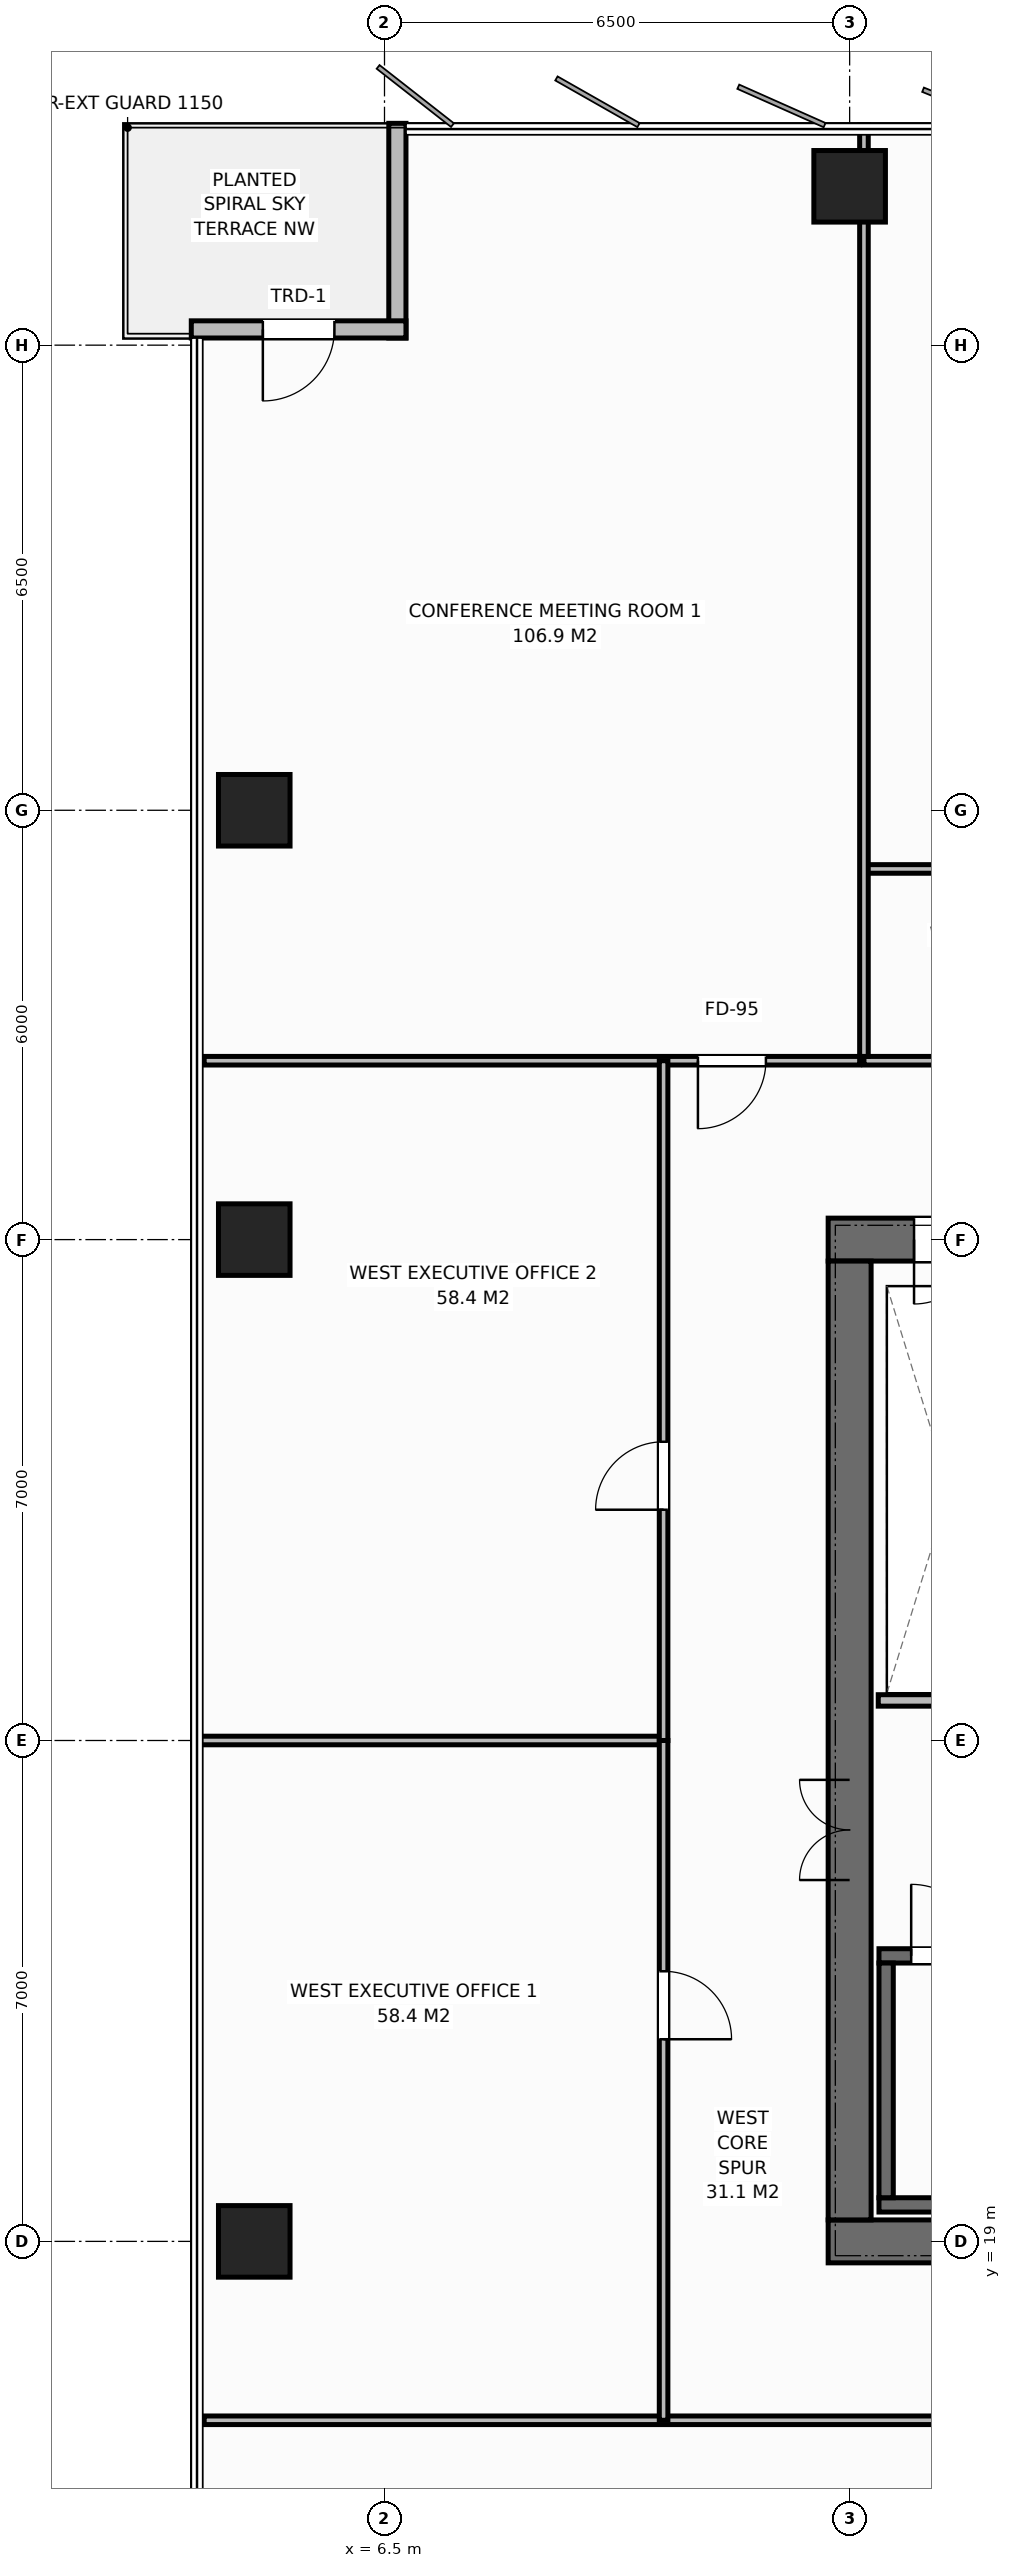
"""IFC4 building model, lengths in metres.
Left out: names, types, materials, properties, quantities, classifications, styles, units other than length and angle.
Written with IfcOpenShell. Run it as: python <this file> out.ifc"""

import sys

from ifc_helpers import new_model, si_unit, direction, frame, frame_2d, origin, origin_2d, place, context, subcontext, project, spatial, rectangle, extrude, element, fill, save


model = new_model("IFC4")
c1 = context("Model", 3, precision=1e-05, world=origin(), true_north=direction((0.0, 1.0)))
c2 = subcontext(c1, "Body", "Model", "MODEL_VIEW")
j1 = project(units=[si_unit("LENGTHUNIT", "METRE"), si_unit("PLANEANGLEUNIT", "RADIAN")], contexts=[c1])
p1 = place(None, origin())
s1 = spatial("IfcSite", under=j1, at=p1, CompositionType="ELEMENT")
p2 = place(p1, origin())
s2 = spatial("IfcBuilding", under=s1, at=p2, CompositionType="ELEMENT")
p3 = place(p2, frame((0.0, 0.0, 148.0)))
s3 = spatial("IfcBuildingStorey", under=s2, at=p3, CompositionType="ELEMENT", Elevation=148.0)
p4 = place(p3, frame((12.7, 19.0, 0.0), z_axis=(0.0, 0.0, 1.0), x_axis=(1.0, 0.0, 0.0)))
e1 = element("IfcWall", 1, at=p4, inside=s3, PredefinedType="SHEAR", context=c2, shape_type="SweptSolid", body=[
    extrude(rectangle(XDim=13.6, YDim=0.6, at=frame_2d((6.8, 0.0))), origin(), (0.0, 0.0, 1.0), 3.8),
])
p5 = place(p4, frame((9.18, 0.0, 0.0)))
e2 = element("IfcOpeningElement", 2, at=p5, cuts=e1, PredefinedType="OPENING", context=c2, shape_type="SweptSolid", body=[
    extrude(rectangle(XDim=1.4, YDim=2.2, at=frame_2d((0.7, 1.1))), frame((0.0, 0.31, 0.0), z_axis=(0.0, -1.0, 0.0), x_axis=(1.0, 0.0, 0.0)), (0.0, 0.0, 1.0), 0.62),
])
p6 = place(p3, frame((12.7, 33.0, 0.0), z_axis=(0.0, 0.0, 1.0), x_axis=(1.0, 0.0, 0.0)))
e3 = element("IfcWall", 3, at=p6, inside=s3, PredefinedType="SHEAR", context=c2, shape_type="SweptSolid", body=[
    extrude(rectangle(XDim=13.6, YDim=0.6, at=frame_2d((6.8, 0.0))), origin(), (0.0, 0.0, 1.0), 3.8),
])
p7 = place(p6, frame((1.2, 0.0, 0.0)))
e4 = element("IfcOpeningElement", 4, at=p7, cuts=e3, PredefinedType="OPENING", context=c2, shape_type="SweptSolid", body=[
    extrude(rectangle(XDim=0.9, YDim=2.15, at=frame_2d((0.45, 1.075))), frame((0.0, 0.31, 0.0), z_axis=(0.0, -1.0, 0.0), x_axis=(1.0, 0.0, 0.0)), (0.0, 0.0, 1.0), 0.62),
])
p8 = place(p6, frame((3.1, 0.0, 0.0)))
e5 = element("IfcOpeningElement", 5, at=p8, cuts=e3, PredefinedType="OPENING", context=c2, shape_type="SweptSolid", body=[
    extrude(rectangle(XDim=0.9, YDim=2.15, at=frame_2d((0.45, 1.075))), frame((0.0, 0.31, 0.0), z_axis=(0.0, -1.0, 0.0), x_axis=(1.0, 0.0, 0.0)), (0.0, 0.0, 1.0), 0.62),
])
p9 = place(p6, frame((4.9, 0.0, 0.0)))
e6 = element("IfcOpeningElement", 6, at=p9, cuts=e3, PredefinedType="OPENING", context=c2, shape_type="SweptSolid", body=[
    extrude(rectangle(XDim=0.9, YDim=2.15, at=frame_2d((0.45, 1.075))), frame((0.0, 0.31, 0.0), z_axis=(0.0, -1.0, 0.0), x_axis=(1.0, 0.0, 0.0)), (0.0, 0.0, 1.0), 0.62),
])
p10 = place(p6, frame((6.8, 0.0, 0.0)))
e7 = element("IfcOpeningElement", 7, at=p10, cuts=e3, PredefinedType="OPENING", context=c2, shape_type="SweptSolid", body=[
    extrude(rectangle(XDim=0.9, YDim=2.15, at=frame_2d((0.45, 1.075))), frame((0.0, 0.31, 0.0), z_axis=(0.0, -1.0, 0.0), x_axis=(1.0, 0.0, 0.0)), (0.0, 0.0, 1.0), 0.62),
])
p11 = place(p6, frame((9.18, 0.0, 0.0)))
e8 = element("IfcOpeningElement", 8, at=p11, cuts=e3, PredefinedType="OPENING", context=c2, shape_type="SweptSolid", body=[
    extrude(rectangle(XDim=1.4, YDim=2.2, at=frame_2d((0.7, 1.1))), frame((0.0, 0.31, 0.0), z_axis=(0.0, -1.0, 0.0), x_axis=(1.0, 0.0, 0.0)), (0.0, 0.0, 1.0), 0.62),
])
p12 = place(p3, frame((13.0, 19.3, 0.0), z_axis=(0.0, 0.0, 1.0), x_axis=(0.0, 1.0, 0.0)))
e9 = element("IfcWall", 9, at=p12, inside=s3, PredefinedType="SHEAR", context=c2, shape_type="SweptSolid", body=[
    extrude(rectangle(XDim=13.4, YDim=0.6, at=frame_2d((6.7, 0.0))), origin(), (0.0, 0.0, 1.0), 3.8),
])
p13 = place(p12, frame((4.75, 0.0, 0.0)))
e10 = element("IfcOpeningElement", 10, at=p13, cuts=e9, PredefinedType="OPENING", context=c2, shape_type="SweptSolid", body=[
    extrude(rectangle(XDim=1.4, YDim=2.2, at=frame_2d((0.7, 1.1))), frame((0.0, 0.31, 0.0), z_axis=(0.0, -1.0, 0.0), x_axis=(1.0, 0.0, 0.0)), (0.0, 0.0, 1.0), 0.62),
])
p14 = place(p3, frame((13.41, 19.51, 0.0), z_axis=(0.0, 0.0, 1.0), x_axis=(1.0, 0.0, 0.0)))
e11 = element("IfcWall", 11, at=p14, inside=s3, PredefinedType="SHEAR", context=c2, shape_type="SweptSolid", body=[
    extrude(rectangle(XDim=8.43, YDim=0.2, at=frame_2d((4.215, 0.0))), origin(), (0.0, 0.0, 1.0), 3.8),
])
p15 = place(p3, frame((13.41, 22.99, 0.0), z_axis=(0.0, 0.0, 1.0), x_axis=(1.0, 0.0, 0.0)))
e12 = element("IfcWall", 12, at=p15, inside=s3, PredefinedType="SHEAR", context=c2, shape_type="SweptSolid", body=[
    extrude(rectangle(XDim=8.43, YDim=0.2, at=frame_2d((4.215, 0.0))), origin(), (0.0, 0.0, 1.0), 3.8),
])
p16 = place(p15, frame((0.45, 0.0, 0.0)))
e13 = element("IfcOpeningElement", 13, at=p16, cuts=e12, PredefinedType="OPENING", context=c2, shape_type="SweptSolid", body=[
    extrude(rectangle(XDim=1.0, YDim=2.15, at=frame_2d((0.5, 1.075))), frame((0.0, 0.11, 0.0), z_axis=(0.0, -1.0, 0.0), x_axis=(1.0, 0.0, 0.0)), (0.0, 0.0, 1.0), 0.22),
])
p17 = place(p3, frame((13.51, 19.61, 0.0), z_axis=(0.0, 0.0, 1.0), x_axis=(0.0, 1.0, 0.0)))
e14 = element("IfcWall", 14, at=p17, inside=s3, PredefinedType="SHEAR", context=c2, shape_type="SweptSolid", body=[
    extrude(rectangle(XDim=3.28, YDim=0.2, at=frame_2d((1.64, 0.0))), origin(), (0.0, 0.0, 1.0), 3.8),
])
for number, where, z_axis, x_axis in (
    (15, (13.0, 47.72, 0.0), (0.0, 0.0, 1.0), (1.0, 0.0, 0.0)),
    (16, (4.68, 19.0, 0.0), (0.0, 0.0, 1.0), (1.0, 0.0, 0.0)),
    (17, (4.68, 33.0, 0.0), (0.0, 0.0, 1.0), (1.0, 0.0, 0.0)),
    (18, (4.68, 39.0, 0.0), (0.0, 0.0, 1.0), (1.0, 0.0, 0.0)),
):
    element("IfcColumn", number, at=place(p3, frame(where, z_axis=z_axis, x_axis=x_axis)), inside=s3, PredefinedType="COLUMN", context=c2, shape_type="SweptSolid", body=[
        extrude(rectangle(XDim=1.0, YDim=1.0, at=origin_2d()), origin(), (0.0, 0.0, 1.0), 3.8),
    ])
p18 = place(p3, frame((6.68, 45.6, 0.0), z_axis=(0.0, 0.0, 1.0), x_axis=(0.0, 1.0, 0.0)))
e19 = element("IfcWall", 19, at=p18, inside=s3, PredefinedType="STANDARD", context=c2, shape_type="SweptSolid", body=[
    extrude(rectangle(XDim=3.0, YDim=0.24, at=frame_2d((1.5, 0.0))), origin(), (0.0, 0.0, 1.0), 3.572),
])
p19 = place(p3, frame((3.8, 45.72, 0.0), z_axis=(0.0, 0.0, 1.0), x_axis=(1.0, 0.0, 0.0)))
e20 = element("IfcWall", 20, at=p19, inside=s3, PredefinedType="STANDARD", context=c2, shape_type="SweptSolid", body=[
    extrude(rectangle(XDim=3.0, YDim=0.24, at=frame_2d((1.5, 0.0))), origin(), (0.0, 0.0, 1.0), 3.572),
])
p20 = place(p19, frame((1.0, 0.0, 0.0)))
e21 = element("IfcOpeningElement", 21, at=p20, cuts=e20, PredefinedType="OPENING", context=c2, shape_type="SweptSolid", body=[
    extrude(rectangle(XDim=1.0, YDim=2.2, at=frame_2d((0.5, 1.1))), frame((0.0, 0.13, 0.0), z_axis=(0.0, -1.0, 0.0), x_axis=(1.0, 0.0, 0.0)), (0.0, 0.0, 1.0), 0.26),
])
p21 = place(p3, frame((13.4, 26.56, 0.0), z_axis=(0.0, 0.0, 1.0), x_axis=(1.0, 0.0, 0.0)))
e22 = element("IfcWall", 22, at=p21, inside=s3, PredefinedType="STANDARD", context=c2, shape_type="SweptSolid", body=[
    extrude(rectangle(XDim=8.34, YDim=0.16, at=frame_2d((4.17, 0.0))), origin(), (0.0, 0.0, 1.0), 3.572),
])
p22 = place(p3, frame((13.2, 35.5, 0.0), z_axis=(0.0, 0.0, 1.0), x_axis=(1.0, 0.0, 0.0)))
e23 = element("IfcWall", 23, at=p22, inside=s3, PredefinedType="PARTITIONING", context=c2, shape_type="SweptSolid", body=[
    extrude(rectangle(XDim=13.16, YDim=0.12, at=frame_2d((6.58, 0.0))), origin(), (0.0, 0.0, 1.0), 3.572),
])
p23 = place(p22, frame((1.35, 0.0, 0.0)))
e24 = element("IfcOpeningElement", 24, at=p23, cuts=e23, PredefinedType="OPENING", context=c2, shape_type="SweptSolid", body=[
    extrude(rectangle(XDim=0.9, YDim=2.15, at=frame_2d((0.45, 1.075))), frame((0.0, 0.07, 0.0), z_axis=(0.0, -1.0, 0.0), x_axis=(1.0, 0.0, 0.0)), (0.0, 0.0, 1.0), 0.14),
])
p24 = place(p22, frame((4.05, 0.0, 0.0)))
e25 = element("IfcOpeningElement", 25, at=p24, cuts=e23, PredefinedType="OPENING", context=c2, shape_type="SweptSolid", body=[
    extrude(rectangle(XDim=0.9, YDim=2.15, at=frame_2d((0.45, 1.075))), frame((0.0, 0.07, 0.0), z_axis=(0.0, -1.0, 0.0), x_axis=(1.0, 0.0, 0.0)), (0.0, 0.0, 1.0), 0.14),
])
p25 = place(p22, frame((8.25, 0.0, 0.0)))
e26 = element("IfcOpeningElement", 26, at=p25, cuts=e23, PredefinedType="OPENING", context=c2, shape_type="SweptSolid", body=[
    extrude(rectangle(XDim=0.9, YDim=2.15, at=frame_2d((0.45, 1.075))), frame((0.0, 0.07, 0.0), z_axis=(0.0, -1.0, 0.0), x_axis=(1.0, 0.0, 0.0)), (0.0, 0.0, 1.0), 0.14),
])
p26 = place(p22, frame((11.0, 0.0, 0.0)))
e27 = element("IfcOpeningElement", 27, at=p26, cuts=e23, PredefinedType="OPENING", context=c2, shape_type="SweptSolid", body=[
    extrude(rectangle(XDim=0.95, YDim=2.15, at=frame_2d((0.475, 1.075))), frame((0.0, 0.07, 0.0), z_axis=(0.0, -1.0, 0.0), x_axis=(1.0, 0.0, 0.0)), (0.0, 0.0, 1.0), 0.14),
])
p27 = place(p3, frame((13.2, 38.18, 0.0), z_axis=(0.0, 0.0, 1.0), x_axis=(1.0, 0.0, 0.0)))
e28 = element("IfcWall", 28, at=p27, inside=s3, PredefinedType="PARTITIONING", context=c2, shape_type="SweptSolid", body=[
    extrude(rectangle(XDim=13.16, YDim=0.12, at=frame_2d((6.58, 0.0))), origin(), (0.0, 0.0, 1.0), 3.572),
])
p28 = place(p3, frame((13.2, 35.56, 0.0), z_axis=(0.0, 0.0, 1.0), x_axis=(0.0, 1.0, 0.0)))
e29 = element("IfcWall", 29, at=p28, inside=s3, PredefinedType="PARTITIONING", context=c2, shape_type="SweptSolid", body=[
    extrude(rectangle(XDim=13.02, YDim=0.12, at=frame_2d((6.51, 0.0))), origin(), (0.0, 0.0, 1.0), 3.022),
])
p29 = place(p3, frame((3.98, 35.5, 0.0), z_axis=(0.0, 0.0, 1.0), x_axis=(1.0, 0.0, 0.0)))
e30 = element("IfcWall", 30, at=p29, inside=s3, PredefinedType="PARTITIONING", context=c2, shape_type="SweptSolid", body=[
    extrude(rectangle(XDim=9.16, YDim=0.12, at=frame_2d((4.58, 0.0))), origin(), (0.0, 0.0, 1.0), 3.572),
])
p30 = place(p29, frame((6.9, 0.0, 0.0)))
e31 = element("IfcOpeningElement", 31, at=p30, cuts=e30, PredefinedType="OPENING", context=c2, shape_type="SweptSolid", body=[
    extrude(rectangle(XDim=0.95, YDim=2.15, at=frame_2d((0.475, 1.075))), frame((0.0, 0.07, 0.0), z_axis=(0.0, -1.0, 0.0), x_axis=(1.0, 0.0, 0.0)), (0.0, 0.0, 1.0), 0.14),
])
p31 = place(p3, frame((3.98, 16.5, 0.0), z_axis=(0.0, 0.0, 1.0), x_axis=(1.0, 0.0, 0.0)))
e32 = element("IfcWall", 32, at=p31, inside=s3, PredefinedType="PARTITIONING", context=c2, shape_type="SweptSolid", body=[
    extrude(rectangle(XDim=15.02, YDim=0.12, at=frame_2d((7.51, 0.0))), origin(), (0.0, 0.0, 1.0), 3.572),
])
p32 = place(p31, frame((10.245, 0.0, 0.0)))
e33 = element("IfcOpeningElement", 33, at=p32, cuts=e32, PredefinedType="OPENING", context=c2, shape_type="SweptSolid", body=[
    extrude(rectangle(XDim=0.95, YDim=2.15, at=frame_2d((0.475, 1.075))), frame((0.0, 0.07, 0.0), z_axis=(0.0, -1.0, 0.0), x_axis=(1.0, 0.0, 0.0)), (0.0, 0.0, 1.0), 0.14),
])
p33 = place(p3, frame((3.82, 26.0, 0.0), z_axis=(0.0, 0.0, 1.0), x_axis=(1.0, 0.0, 0.0)))
e34 = element("IfcWall", 34, at=p33, inside=s3, PredefinedType="PARTITIONING", context=c2, shape_type="SweptSolid", body=[
    extrude(rectangle(XDim=6.58, YDim=0.12, at=frame_2d((3.29, 0.0))), origin(), (0.0, 0.0, 1.0), 3.572),
])
p34 = place(p3, frame((10.4, 16.5, 0.0), z_axis=(0.0, 0.0, 1.0), x_axis=(0.0, 1.0, 0.0)))
e35 = element("IfcWall", 35, at=p34, inside=s3, PredefinedType="PARTITIONING", context=c2, shape_type="SweptSolid", body=[
    extrude(rectangle(XDim=9.5, YDim=0.12, at=frame_2d((4.75, 0.0))), origin(), (0.0, 0.0, 1.0), 3.572),
])
p35 = place(p34, frame((5.325, 0.0, 0.0)))
e36 = element("IfcOpeningElement", 36, at=p35, cuts=e35, PredefinedType="OPENING", context=c2, shape_type="SweptSolid", body=[
    extrude(rectangle(XDim=0.95, YDim=2.15, at=frame_2d((0.475, 1.075))), frame((0.0, 0.07, 0.0), z_axis=(0.0, -1.0, 0.0), x_axis=(1.0, 0.0, 0.0)), (0.0, 0.0, 1.0), 0.14),
])
p36 = place(p3, frame((10.4, 26.0, 0.0), z_axis=(0.0, 0.0, 1.0), x_axis=(0.0, 1.0, 0.0)))
e37 = element("IfcWall", 37, at=p36, inside=s3, PredefinedType="PARTITIONING", context=c2, shape_type="SweptSolid", body=[
    extrude(rectangle(XDim=9.5, YDim=0.12, at=frame_2d((4.75, 0.0))), origin(), (0.0, 0.0, 1.0), 3.572),
])
p37 = place(p36, frame((3.225, 0.0, 0.0)))
e38 = element("IfcOpeningElement", 38, at=p37, cuts=e37, PredefinedType="OPENING", context=c2, shape_type="SweptSolid", body=[
    extrude(rectangle(XDim=0.95, YDim=2.15, at=frame_2d((0.475, 1.075))), frame((0.0, 0.07, 0.0), z_axis=(0.0, -1.0, 0.0), x_axis=(1.0, 0.0, 0.0)), (0.0, 0.0, 1.0), 0.14),
])
p38 = place(p20, origin())
e39 = element("IfcDoor", 39, at=p38, inside=s3, OperationType="SINGLE_SWING_RIGHT", PredefinedType="DOOR", context=c2, shape_type="SweptSolid", body=[
    extrude(rectangle(XDim=1.0, YDim=2.2, at=frame_2d((0.5, 1.1))), frame((0.0, 0.025, 0.0), z_axis=(0.0, -1.0, 0.0), x_axis=(1.0, 0.0, 0.0)), (0.0, 0.0, 1.0), 0.05),
])
fill(e21, e39)
p39 = place(p16, origin())
e40 = element("IfcDoor", 40, at=p39, inside=s3, OperationType="SINGLE_SWING_LEFT", PredefinedType="DOOR", context=c2, shape_type="SweptSolid", body=[
    extrude(rectangle(XDim=1.0, YDim=2.15, at=frame_2d((0.5, 1.075))), frame((0.0, 0.025, 0.0), z_axis=(0.0, -1.0, 0.0), x_axis=(1.0, 0.0, 0.0)), (0.0, 0.0, 1.0), 0.05),
])
fill(e13, e40)
p40 = place(p13, origin())
e41 = element("IfcDoor", 41, at=p40, inside=s3, OperationType="DOUBLE_DOOR_SINGLE_SWING", PredefinedType="DOOR", context=c2, shape_type="SweptSolid", body=[
    extrude(rectangle(XDim=1.4, YDim=2.2, at=frame_2d((0.7, 1.1))), frame((0.0, 0.025, 0.0), z_axis=(0.0, -1.0, 0.0), x_axis=(1.0, 0.0, 0.0)), (0.0, 0.0, 1.0), 0.05),
])
fill(e10, e41)
p41 = place(p7, origin())
e42 = element("IfcDoor", 42, at=p41, inside=s3, OperationType="SINGLE_SWING_RIGHT", PredefinedType="DOOR", context=c2, shape_type="SweptSolid", body=[
    extrude(rectangle(XDim=0.9, YDim=2.15, at=frame_2d((0.45, 1.075))), frame((0.0, -0.025, 0.0), z_axis=(0.0, -1.0, 0.0), x_axis=(1.0, 0.0, 0.0)), (0.0, 0.0, 1.0), 0.05),
])
fill(e4, e42)
p42 = place(p30, origin())
e43 = element("IfcDoor", 43, at=p42, inside=s3, OperationType="SINGLE_SWING_RIGHT", PredefinedType="DOOR", context=c2, shape_type="SweptSolid", body=[
    extrude(rectangle(XDim=0.95, YDim=2.15, at=frame_2d((0.475, 1.075))), frame((0.0, 0.025, 0.0), z_axis=(0.0, -1.0, 0.0), x_axis=(1.0, 0.0, 0.0)), (0.0, 0.0, 1.0), 0.05),
])
fill(e31, e43)
p43 = place(p35, origin())
e44 = element("IfcDoor", 44, at=p43, inside=s3, OperationType="SINGLE_SWING_RIGHT", PredefinedType="DOOR", context=c2, shape_type="SweptSolid", body=[
    extrude(rectangle(XDim=0.95, YDim=2.15, at=frame_2d((0.475, 1.075))), frame((0.0, 0.025, 0.0), z_axis=(0.0, -1.0, 0.0), x_axis=(1.0, 0.0, 0.0)), (0.0, 0.0, 1.0), 0.05),
])
fill(e36, e44)
p44 = place(p37, origin())
e45 = element("IfcDoor", 45, at=p44, inside=s3, OperationType="SINGLE_SWING_LEFT", PredefinedType="DOOR", context=c2, shape_type="SweptSolid", body=[
    extrude(rectangle(XDim=0.95, YDim=2.15, at=frame_2d((0.475, 1.075))), frame((0.0, 0.025, 0.0), z_axis=(0.0, -1.0, 0.0), x_axis=(1.0, 0.0, 0.0)), (0.0, 0.0, 1.0), 0.05),
])
fill(e38, e45)
save(model, sys.argv[1])
